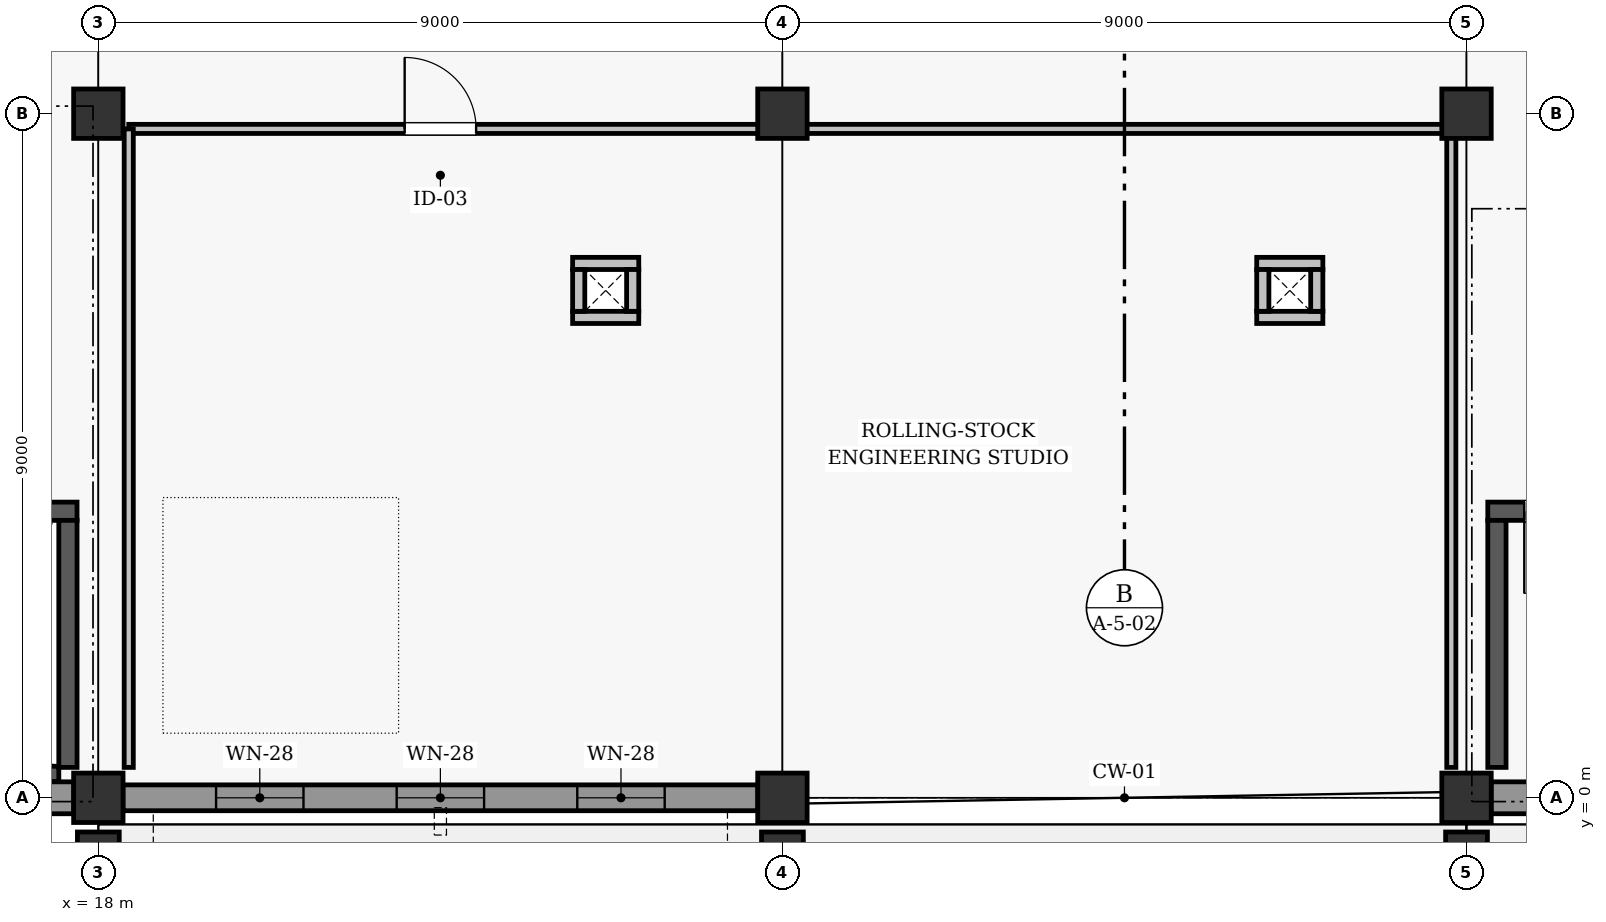
"""IFC4 building model, lengths in metres.
Left out: names, types, materials, properties, quantities, classifications, styles, units other than length and angle.
Written with IfcOpenShell. Run it as: python <this file> out.ifc"""

import sys

from ifc_helpers import new_model, si_unit, direction, frame, frame_2d, origin, origin_2d, place, context, subcontext, project, spatial, rectangle, extrude, element, fill, save


model = new_model("IFC4")
c1 = context("Model", 3, precision=1e-05, world=origin(), true_north=direction((0.0, 1.0)))
c2 = subcontext(c1, "Body", "Model", "MODEL_VIEW")
j1 = project(units=[si_unit("LENGTHUNIT", "METRE"), si_unit("PLANEANGLEUNIT", "RADIAN")], contexts=[c1])
p1 = place(None, origin())
s1 = spatial("IfcSite", under=j1, at=p1, CompositionType="ELEMENT")
p2 = place(p1, origin())
s2 = spatial("IfcBuilding", under=s1, at=p2, CompositionType="ELEMENT")
p3 = place(p2, frame((0.0, 0.0, 4.8)))
s3 = spatial("IfcBuildingStorey", under=s2, at=p3, CompositionType="ELEMENT", Elevation=4.8)
for number, where, z_axis, x_axis in (
    (1, (18.0, 0.0, 0.0), (0.0, 0.0, 1.0), (1.0, 0.0, 0.0)),
    (2, (18.0, 9.0, 0.0), (0.0, 0.0, 1.0), (1.0, 0.0, 0.0)),
    (3, (27.0, 0.0, 0.0), (0.0, 0.0, 1.0), (1.0, 0.0, 0.0)),
    (4, (27.0, 9.0, 0.0), (0.0, 0.0, 1.0), (1.0, 0.0, 0.0)),
    (5, (36.0, 0.0, 0.0), (0.0, 0.0, 1.0), (1.0, 0.0, 0.0)),
    (6, (36.0, 9.0, 0.0), (0.0, 0.0, 1.0), (1.0, 0.0, 0.0)),
):
    element("IfcColumn", number, at=place(p3, frame(where, z_axis=z_axis, x_axis=x_axis)), inside=s3, PredefinedType="COLUMN", context=c2, shape_type="SweptSolid", body=[
        extrude(rectangle(XDim=0.65, YDim=0.65, at=origin_2d()), origin(), (0.0, 0.0, 1.0), 3.6),
    ])
for number, where, z_axis, x_axis in (
    (7, (18.0, -0.85, 0.0), (0.0, 0.0, 1.0), (1.0, 0.0, 0.0)),
    (8, (27.0, -0.85, 0.0), (0.0, 0.0, 1.0), (1.0, 0.0, 0.0)),
    (9, (36.0, -0.85, 0.0), (0.0, 0.0, 1.0), (1.0, 0.0, 0.0)),
):
    element("IfcColumn", number, at=place(p3, frame(where, z_axis=z_axis, x_axis=x_axis)), inside=s3, PredefinedType="PILASTER", context=c2, shape_type="SweptSolid", body=[
        extrude(rectangle(XDim=0.55, YDim=0.8, at=origin_2d()), origin(), (0.0, 0.0, 1.0), 3.6),
    ])
p4 = place(p3, frame((9.323, 0.0, 0.0), z_axis=(0.0, 0.0, 1.0), x_axis=(1.0, 0.0, 0.0)))
e10 = element("IfcWall", 10, at=p4, inside=s3, PredefinedType="SOLIDWALL", context=c2, shape_type="SweptSolid", body=[
    extrude(rectangle(XDim=8.354, YDim=0.42, at=frame_2d((4.177, 0.0))), origin(), (0.0, 0.0, 1.0), 2.642),
])
p5 = place(p3, frame((18.323, 0.0, 0.0), z_axis=(0.0, 0.0, 1.0), x_axis=(1.0, 0.0, 0.0)))
e11 = element("IfcWall", 11, at=p5, inside=s3, PredefinedType="SOLIDWALL", context=c2, shape_type="SweptSolid", body=[
    extrude(rectangle(XDim=8.354, YDim=0.34, at=frame_2d((4.177, 0.0))), origin(), (0.0, 0.0, 1.0), 2.642),
])
p6 = place(p5, frame((1.226, 0.0, 0.5)))
e12 = element("IfcOpeningElement", 12, at=p6, cuts=e11, PredefinedType="OPENING", context=c2, shape_type="SweptSolid", body=[
    extrude(rectangle(XDim=1.15, YDim=1.96, at=frame_2d((0.575, 0.98))), frame((0.0, 0.18, 0.0), z_axis=(0.0, -1.0, 0.0), x_axis=(1.0, 0.0, 0.0)), (0.0, 0.0, 1.0), 0.36),
])
p7 = place(p5, frame((3.602, 0.0, 0.5)))
e13 = element("IfcOpeningElement", 13, at=p7, cuts=e11, PredefinedType="OPENING", context=c2, shape_type="SweptSolid", body=[
    extrude(rectangle(XDim=1.15, YDim=1.96, at=frame_2d((0.575, 0.98))), frame((0.0, 0.18, 0.0), z_axis=(0.0, -1.0, 0.0), x_axis=(1.0, 0.0, 0.0)), (0.0, 0.0, 1.0), 0.36),
])
p8 = place(p5, frame((5.978, 0.0, 0.5)))
e14 = element("IfcOpeningElement", 14, at=p8, cuts=e11, PredefinedType="OPENING", context=c2, shape_type="SweptSolid", body=[
    extrude(rectangle(XDim=1.15, YDim=1.96, at=frame_2d((0.575, 0.98))), frame((0.0, 0.18, 0.0), z_axis=(0.0, -1.0, 0.0), x_axis=(1.0, 0.0, 0.0)), (0.0, 0.0, 1.0), 0.36),
])
p9 = place(p3, frame((36.323, 0.0, 0.0), z_axis=(0.0, 0.0, 1.0), x_axis=(1.0, 0.0, 0.0)))
e15 = element("IfcWall", 15, at=p9, inside=s3, PredefinedType="SOLIDWALL", context=c2, shape_type="SweptSolid", body=[
    extrude(rectangle(XDim=8.354, YDim=0.42, at=frame_2d((4.177, 0.0))), origin(), (0.0, 0.0, 1.0), 2.642),
])
p10 = place(p3, frame((11.07, 0.315, 0.0), z_axis=(0.0, 0.0, 1.0), x_axis=(1.0, 0.0, 0.0)))
e16 = element("IfcWall", 16, at=p10, inside=s3, PredefinedType="SHEAR", context=c2, shape_type="SweptSolid", body=[
    extrude(rectangle(XDim=6.41, YDim=0.2, at=frame_2d((3.205, 0.0))), origin(), (0.0, 0.0, 1.0), 3.35),
])
p11 = place(p3, frame((9.28, 3.77, 0.0), z_axis=(0.0, 0.0, 1.0), x_axis=(1.0, 0.0, 0.0)))
e17 = element("IfcWall", 17, at=p11, inside=s3, PredefinedType="SHEAR", context=c2, shape_type="SweptSolid", body=[
    extrude(rectangle(XDim=8.44, YDim=0.24, at=frame_2d((4.22, 0.0))), origin(), (0.0, 0.0, 1.0), 3.35),
])
p12 = place(p11, frame((0.48, 0.0, 0.0)))
e18 = element("IfcOpeningElement", 18, at=p12, cuts=e17, PredefinedType="OPENING", context=c2, shape_type="SweptSolid", body=[
    extrude(rectangle(XDim=1.08, YDim=2.08, at=frame_2d((0.54, 1.04))), frame((0.0, 0.13, 0.0), z_axis=(0.0, -1.0, 0.0), x_axis=(1.0, 0.0, 0.0)), (0.0, 0.0, 1.0), 0.26),
])
p13 = place(p3, frame((17.6, 0.4, 0.0), z_axis=(0.0, 0.0, 1.0), x_axis=(0.0, 1.0, 0.0)))
e19 = element("IfcWall", 19, at=p13, inside=s3, PredefinedType="SHEAR", context=c2, shape_type="SweptSolid", body=[
    extrude(rectangle(XDim=3.25, YDim=0.24, at=frame_2d((1.625, 0.0))), origin(), (0.0, 0.0, 1.0), 3.35),
])
p14 = place(p3, frame((36.28, 3.77, 0.0), z_axis=(0.0, 0.0, 1.0), x_axis=(1.0, 0.0, 0.0)))
e20 = element("IfcWall", 20, at=p14, inside=s3, PredefinedType="SHEAR", context=c2, shape_type="SweptSolid", body=[
    extrude(rectangle(XDim=8.44, YDim=0.24, at=frame_2d((4.22, 0.0))), origin(), (0.0, 0.0, 1.0), 3.35),
])
p15 = place(p14, frame((0.48, 0.0, 0.0)))
e21 = element("IfcOpeningElement", 21, at=p15, cuts=e20, PredefinedType="OPENING", context=c2, shape_type="SweptSolid", body=[
    extrude(rectangle(XDim=1.08, YDim=2.08, at=frame_2d((0.54, 1.04))), frame((0.0, 0.13, 0.0), z_axis=(0.0, -1.0, 0.0), x_axis=(1.0, 0.0, 0.0)), (0.0, 0.0, 1.0), 0.26),
])
p16 = place(p3, frame((36.4, 0.4, 0.0), z_axis=(0.0, 0.0, 1.0), x_axis=(0.0, 1.0, 0.0)))
e22 = element("IfcWall", 22, at=p16, inside=s3, PredefinedType="SHEAR", context=c2, shape_type="SweptSolid", body=[
    extrude(rectangle(XDim=3.25, YDim=0.24, at=frame_2d((1.625, 0.0))), origin(), (0.0, 0.0, 1.0), 3.35),
])
for number, where, z_axis, x_axis in (
    (23, (24.24, 6.32, 0.0), (0.0, 0.0, 1.0), (1.0, 0.0, 0.0)),
    (24, (24.24, 7.03, 0.0), (0.0, 0.0, 1.0), (1.0, 0.0, 0.0)),
):
    element("IfcWall", number, at=place(p3, frame(where, z_axis=z_axis, x_axis=x_axis)), inside=s3, PredefinedType="PARTITIONING", context=c2, shape_type="SweptSolid", body=[
        extrude(rectangle(XDim=0.87, YDim=0.16, at=frame_2d((0.435, 0.0))), origin(), (0.0, 0.0, 1.0), 3.35),
    ])
for number, where, z_axis, x_axis in (
    (25, (24.32, 6.4, 0.0), (0.0, 0.0, 1.0), (0.0, 1.0, 0.0)),
    (26, (25.03, 6.4, 0.0), (0.0, 0.0, 1.0), (0.0, 1.0, 0.0)),
):
    element("IfcWall", number, at=place(p3, frame(where, z_axis=z_axis, x_axis=x_axis)), inside=s3, PredefinedType="PARTITIONING", context=c2, shape_type="SweptSolid", body=[
        extrude(rectangle(XDim=0.55, YDim=0.16, at=frame_2d((0.275, 0.0))), origin(), (0.0, 0.0, 1.0), 3.35),
    ])
for number, where, z_axis, x_axis in (
    (27, (33.24, 6.32, 0.0), (0.0, 0.0, 1.0), (1.0, 0.0, 0.0)),
    (28, (33.24, 7.03, 0.0), (0.0, 0.0, 1.0), (1.0, 0.0, 0.0)),
):
    element("IfcWall", number, at=place(p3, frame(where, z_axis=z_axis, x_axis=x_axis)), inside=s3, PredefinedType="PARTITIONING", context=c2, shape_type="SweptSolid", body=[
        extrude(rectangle(XDim=0.87, YDim=0.16, at=frame_2d((0.435, 0.0))), origin(), (0.0, 0.0, 1.0), 3.35),
    ])
for number, where, z_axis, x_axis in (
    (29, (33.32, 6.4, 0.0), (0.0, 0.0, 1.0), (0.0, 1.0, 0.0)),
    (30, (34.03, 6.4, 0.0), (0.0, 0.0, 1.0), (0.0, 1.0, 0.0)),
):
    element("IfcWall", number, at=place(p3, frame(where, z_axis=z_axis, x_axis=x_axis)), inside=s3, PredefinedType="PARTITIONING", context=c2, shape_type="SweptSolid", body=[
        extrude(rectangle(XDim=0.55, YDim=0.16, at=frame_2d((0.275, 0.0))), origin(), (0.0, 0.0, 1.0), 3.35),
    ])
p17 = place(p3, frame((18.4, 8.8, 0.0), z_axis=(0.0, 0.0, 1.0), x_axis=(1.0, 0.0, 0.0)))
e31 = element("IfcWall", 31, at=p17, inside=s3, PredefinedType="PARTITIONING", context=c2, shape_type="SweptSolid", body=[
    extrude(rectangle(XDim=17.4, YDim=0.12, at=frame_2d((8.7, 0.0))), origin(), (0.0, 0.0, 1.0), 2.595),
])
p18 = place(p17, frame((3.63, 0.0, 0.0)))
e32 = element("IfcOpeningElement", 32, at=p18, cuts=e31, PredefinedType="OPENING", context=c2, shape_type="SweptSolid", body=[
    extrude(rectangle(XDim=0.94, YDim=2.06, at=frame_2d((0.47, 1.03))), frame((0.0, 0.07, 0.0), z_axis=(0.0, -1.0, 0.0), x_axis=(1.0, 0.0, 0.0)), (0.0, 0.0, 1.0), 0.14),
])
for number, where, z_axis, x_axis in (
    (33, (18.4, 0.4, 0.0), (0.0, 0.0, 1.0), (0.0, 1.0, 0.0)),
    (34, (35.8, 0.4, 0.0), (0.0, 0.0, 1.0), (0.0, 1.0, 0.0)),
):
    element("IfcWall", number, at=place(p3, frame(where, z_axis=z_axis, x_axis=x_axis)), inside=s3, PredefinedType="PARTITIONING", context=c2, shape_type="SweptSolid", body=[
        extrude(rectangle(XDim=8.4, YDim=0.12, at=frame_2d((4.2, 0.0))), origin(), (0.0, 0.0, 1.0), 2.595),
    ])
p19 = place(p6, origin())
e35 = element("IfcWindow", 35, at=p19, inside=s3, PartitioningType="SINGLE_PANEL", PredefinedType="WINDOW", context=c2, shape_type="SweptSolid", body=[
    extrude(rectangle(XDim=1.15, YDim=1.96, at=frame_2d((0.575, 0.98))), frame((0.0, 0.03, 0.0), z_axis=(0.0, -1.0, 0.0), x_axis=(1.0, 0.0, 0.0)), (0.0, 0.0, 1.0), 0.06),
])
fill(e12, e35)
p20 = place(p7, origin())
e36 = element("IfcWindow", 36, at=p20, inside=s3, PartitioningType="SINGLE_PANEL", PredefinedType="WINDOW", context=c2, shape_type="SweptSolid", body=[
    extrude(rectangle(XDim=1.15, YDim=1.96, at=frame_2d((0.575, 0.98))), frame((0.0, 0.03, 0.0), z_axis=(0.0, -1.0, 0.0), x_axis=(1.0, 0.0, 0.0)), (0.0, 0.0, 1.0), 0.06),
])
fill(e13, e36)
p21 = place(p8, origin())
e37 = element("IfcWindow", 37, at=p21, inside=s3, PartitioningType="SINGLE_PANEL", PredefinedType="WINDOW", context=c2, shape_type="SweptSolid", body=[
    extrude(rectangle(XDim=1.15, YDim=1.96, at=frame_2d((0.575, 0.98))), frame((0.0, 0.03, 0.0), z_axis=(0.0, -1.0, 0.0), x_axis=(1.0, 0.0, 0.0)), (0.0, 0.0, 1.0), 0.06),
])
fill(e14, e37)
p22 = place(p15, frame((1.08, 0.0, 0.0), z_axis=(0.0, 0.0, 1.0), x_axis=(-1.0, 0.0, 0.0)))
e38 = element("IfcDoor", 38, at=p22, inside=s3, OperationType="SINGLE_SWING_LEFT", PredefinedType="DOOR", context=c2, shape_type="SweptSolid", body=[
    extrude(rectangle(XDim=1.08, YDim=2.08, at=frame_2d((0.54, 1.04))), frame((0.0, 0.025, 0.0), z_axis=(0.0, -1.0, 0.0), x_axis=(1.0, 0.0, 0.0)), (0.0, 0.0, 1.0), 0.05),
])
fill(e21, e38)
p23 = place(p18, origin())
e39 = element("IfcDoor", 39, at=p23, inside=s3, OperationType="SINGLE_SWING_LEFT", PredefinedType="DOOR", context=c2, shape_type="SweptSolid", body=[
    extrude(rectangle(XDim=0.94, YDim=2.06, at=frame_2d((0.47, 1.03))), frame((0.0, 0.025, 0.0), z_axis=(0.0, -1.0, 0.0), x_axis=(1.0, 0.0, 0.0)), (0.0, 0.0, 1.0), 0.05),
])
fill(e32, e39)
save(model, sys.argv[1])
